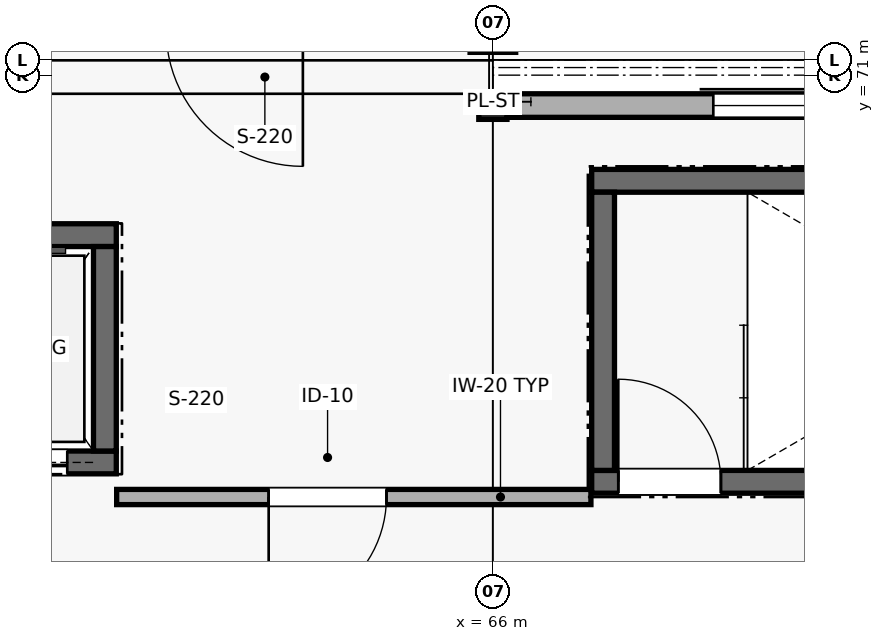
"""IFC4 building model, lengths in metres.
Left out: names, types, materials, properties, quantities, classifications, styles, units other than length and angle.
Written with IfcOpenShell. Run it as: python <this file> out.ifc"""

import sys

from ifc_helpers import new_model, si_unit, direction, frame, frame_2d, origin, origin_2d, place, context, subcontext, project, spatial, rectangle, i_section, extrude, element, fill, save


model = new_model("IFC4")
c1 = context("Model", 3, precision=1e-05, world=origin(), true_north=direction((0.0, 1.0)))
c2 = subcontext(c1, "Body", "Model", "MODEL_VIEW")
j1 = project(units=[si_unit("LENGTHUNIT", "METRE"), si_unit("PLANEANGLEUNIT", "RADIAN")], contexts=[c1])
p1 = place(None, origin())
s1 = spatial("IfcSite", under=j1, at=p1, CompositionType="ELEMENT")
p2 = place(p1, origin())
s2 = spatial("IfcBuilding", under=s1, at=p2, CompositionType="ELEMENT")
p3 = place(p2, frame((0.0, 0.0, 9.9)))
s3 = spatial("IfcBuildingStorey", under=s2, at=p3, CompositionType="ELEMENT", Elevation=9.9)
p4 = place(p3, frame((66.0, 70.6, 0.0), z_axis=(0.0, 0.0, 1.0), x_axis=(1.0, 0.0, 0.0)))
e1 = element("IfcColumn", 1, at=p4, inside=s3, PredefinedType="COLUMN", context=c2, shape_type="SweptSolid", body=[
    extrude(i_section(OverallWidth=0.371, OverallDepth=0.363, WebThickness=0.013, FlangeThickness=0.022, FilletRadius=0.018, at=origin_2d()), origin(), (0.0, 0.0, 1.0), 4.2),
])
p5 = place(p3, frame((76.995, 70.6, 0.0), z_axis=(0.0, 0.0, 1.0), x_axis=(-1.0, 0.0, 0.0)))
e2 = element("IfcWall", 2, at=p5, inside=s3, PredefinedType="SOLIDWALL", context=c2, shape_type="SweptSolid", body=[
    extrude(rectangle(XDim=10.991, YDim=0.31, at=frame_2d((5.495, 0.0))), origin(), (0.0, 0.0, 1.0), 3.302),
])
p6 = place(p5, frame((2.595, 0.0, 1.05)))
e3 = element("IfcOpeningElement", 3, at=p6, cuts=e2, PredefinedType="OPENING", context=c2, shape_type="SweptSolid", body=[
    extrude(rectangle(XDim=1.8, YDim=1.8, at=frame_2d((0.9, 0.9))), frame((0.0, 0.165, 0.0), z_axis=(0.0, -1.0, 0.0), x_axis=(1.0, 0.0, 0.0)), (0.0, 0.0, 1.0), 0.33),
])
p7 = place(p5, frame((6.295, 0.0, 1.05)))
e4 = element("IfcOpeningElement", 4, at=p7, cuts=e2, PredefinedType="OPENING", context=c2, shape_type="SweptSolid", body=[
    extrude(rectangle(XDim=1.8, YDim=1.8, at=frame_2d((0.9, 0.9))), frame((0.0, 0.165, 0.0), z_axis=(0.0, -1.0, 0.0), x_axis=(1.0, 0.0, 0.0)), (0.0, 0.0, 1.0), 0.33),
])
p8 = place(p3, frame((67.3, 65.65, 0.0), z_axis=(0.0, 0.0, 1.0), x_axis=(1.0, 0.0, 0.0)))
e5 = element("IfcWall", 5, at=p8, inside=s3, PredefinedType="SHEAR", context=c2, shape_type="SweptSolid", body=[
    extrude(rectangle(XDim=8.65, YDim=0.3, at=frame_2d((4.325, 0.0))), origin(), (0.0, 0.0, 1.0), 3.99),
])
p9 = place(p8, frame((0.35, 0.0, 0.0)))
e6 = element("IfcOpeningElement", 6, at=p9, cuts=e5, PredefinedType="OPENING", context=c2, shape_type="SweptSolid", body=[
    extrude(rectangle(XDim=1.35, YDim=2.2, at=frame_2d((0.675, 1.1))), frame((0.0, 0.16, 0.0), z_axis=(0.0, -1.0, 0.0), x_axis=(1.0, 0.0, 0.0)), (0.0, 0.0, 1.0), 0.32),
])
p10 = place(p3, frame((75.95, 69.61, 0.0), z_axis=(0.0, 0.0, 1.0), x_axis=(-1.0, 0.0, 0.0)))
e7 = element("IfcWall", 7, at=p10, inside=s3, PredefinedType="SHEAR", context=c2, shape_type="SweptSolid", body=[
    extrude(rectangle(XDim=8.65, YDim=0.3, at=frame_2d((4.325, 0.0))), origin(), (0.0, 0.0, 1.0), 3.99),
])
p11 = place(p3, frame((67.45, 69.46, 0.0), z_axis=(0.0, 0.0, 1.0), x_axis=(0.0, -1.0, 0.0)))
e8 = element("IfcWall", 8, at=p11, inside=s3, PredefinedType="SHEAR", context=c2, shape_type="SweptSolid", body=[
    extrude(rectangle(XDim=3.66, YDim=0.3, at=frame_2d((1.83, 0.0))), origin(), (0.0, 0.0, 1.0), 3.99),
])
p12 = place(p3, frame((58.555, 65.905, 0.0), z_axis=(0.0, 0.0, 1.0), x_axis=(1.0, 0.0, 0.0)))
e9 = element("IfcWall", 9, at=p12, inside=s3, PredefinedType="SHEAR", context=c2, shape_type="SweptSolid", body=[
    extrude(rectangle(XDim=2.49, YDim=0.3, at=frame_2d((1.245, 0.0))), origin(), (0.0, 0.0, 1.0), 3.99),
])
p13 = place(p12, frame((0.645, 0.0, 0.0)))
e10 = element("IfcOpeningElement", 10, at=p13, cuts=e9, PredefinedType="OPENING", context=c2, shape_type="SweptSolid", body=[
    extrude(rectangle(XDim=1.2, YDim=2.15, at=frame_2d((0.6, 1.075))), frame((0.0, 0.16, 0.0), z_axis=(0.0, -1.0, 0.0), x_axis=(1.0, 0.0, 0.0)), (0.0, 0.0, 1.0), 0.32),
])
p14 = place(p3, frame((61.045, 68.895, 0.0), z_axis=(0.0, 0.0, 1.0), x_axis=(-1.0, 0.0, 0.0)))
e11 = element("IfcWall", 11, at=p14, inside=s3, PredefinedType="SHEAR", context=c2, shape_type="SweptSolid", body=[
    extrude(rectangle(XDim=2.49, YDim=0.3, at=frame_2d((1.245, 0.0))), origin(), (0.0, 0.0, 1.0), 3.99),
])
p15 = place(p3, frame((60.895, 66.055, 0.0), z_axis=(0.0, 0.0, 1.0), x_axis=(0.0, 1.0, 0.0)))
e12 = element("IfcWall", 12, at=p15, inside=s3, PredefinedType="SHEAR", context=c2, shape_type="SweptSolid", body=[
    extrude(rectangle(XDim=2.69, YDim=0.3, at=frame_2d((1.345, 0.0))), origin(), (0.0, 0.0, 1.0), 3.99),
])
p16 = place(p3, frame((61.05, 65.45, 0.0), z_axis=(0.0, 0.0, 1.0), x_axis=(1.0, 0.0, 0.0)))
e13 = element("IfcWall", 13, at=p16, inside=s3, PredefinedType="PARTITIONING", context=c2, shape_type="SweptSolid", body=[
    extrude(rectangle(XDim=6.24, YDim=0.2, at=frame_2d((3.12, 0.0))), origin(), (0.0, 0.0, 1.0), 3.99),
])
p17 = place(p16, frame((2.0, 0.0, 0.0)))
e14 = element("IfcOpeningElement", 14, at=p17, cuts=e13, PredefinedType="OPENING", context=c2, shape_type="SweptSolid", body=[
    extrude(rectangle(XDim=1.55, YDim=2.3, at=frame_2d((0.775, 1.15))), frame((0.0, 0.11, 0.0), z_axis=(0.0, -1.0, 0.0), x_axis=(1.0, 0.0, 0.0)), (0.0, 0.0, 1.0), 0.22),
])
p18 = place(p7, origin())
e15 = element("IfcWindow", 15, at=p18, inside=s3, PartitioningType="SINGLE_PANEL", PredefinedType="WINDOW", context=c2, shape_type="SweptSolid", body=[
    extrude(rectangle(XDim=1.8, YDim=1.8, at=frame_2d((0.9, 0.9))), frame((0.0, 0.03, 0.0), z_axis=(0.0, -1.0, 0.0), x_axis=(1.0, 0.0, 0.0)), (0.0, 0.0, 1.0), 0.06),
])
fill(e4, e15)
p19 = place(p9, origin())
e16 = element("IfcDoor", 16, at=p19, inside=s3, OperationType="SINGLE_SWING_LEFT", PredefinedType="DOOR", context=c2, shape_type="SweptSolid", body=[
    extrude(rectangle(XDim=1.35, YDim=2.2, at=frame_2d((0.675, 1.1))), frame((0.0, 0.025, 0.0), z_axis=(0.0, -1.0, 0.0), x_axis=(1.0, 0.0, 0.0)), (0.0, 0.0, 1.0), 0.05),
])
fill(e6, e16)
p20 = place(p13, frame((1.2, 0.0, 0.0), z_axis=(0.0, 0.0, 1.0), x_axis=(-1.0, 0.0, 0.0)))
e17 = element("IfcDoor", 17, at=p20, inside=s3, OperationType="DOUBLE_DOOR_SLIDING", PredefinedType="DOOR", context=c2, shape_type="SweptSolid", body=[
    extrude(rectangle(XDim=1.2, YDim=2.15, at=frame_2d((0.6, 1.075))), frame((0.0, 0.025, 0.0), z_axis=(0.0, -1.0, 0.0), x_axis=(1.0, 0.0, 0.0)), (0.0, 0.0, 1.0), 0.05),
])
fill(e10, e17)
p21 = place(p17, frame((1.55, 0.0, 0.0), z_axis=(0.0, 0.0, 1.0), x_axis=(-1.0, 0.0, 0.0)))
e18 = element("IfcDoor", 18, at=p21, inside=s3, OperationType="SINGLE_SWING_RIGHT", PredefinedType="DOOR", context=c2, shape_type="SweptSolid", body=[
    extrude(rectangle(XDim=1.55, YDim=2.3, at=frame_2d((0.775, 1.15))), frame((0.0, 0.025, 0.0), z_axis=(0.0, -1.0, 0.0), x_axis=(1.0, 0.0, 0.0)), (0.0, 0.0, 1.0), 0.05),
])
fill(e14, e18)
save(model, sys.argv[1])
